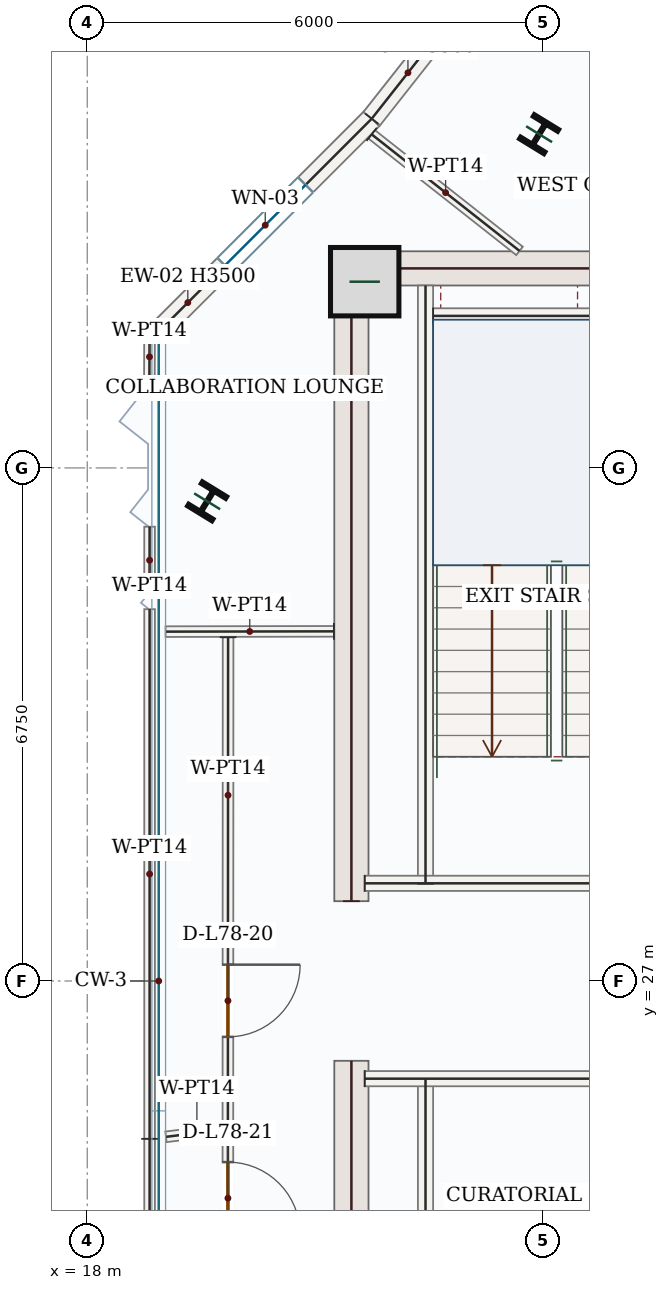
"""IFC4 building model, lengths in metres.
Left out: names, types, materials, properties, quantities, classifications, styles, units other than length and angle.
Written with IfcOpenShell. Run it as: python <this file> out.ifc"""

import sys

from ifc_helpers import new_model, si_unit, direction, frame, frame_2d, origin, origin_2d, place, context, subcontext, project, spatial, rectangle, i_section, extrude, source, transform, mapped, element, fill, save


model = new_model("IFC4")
c1 = context("Model", 3, precision=1e-05, world=origin(), true_north=direction((0.0, 1.0)))
c2 = subcontext(c1, "Body", "Model", "MODEL_VIEW")
j1 = project(units=[si_unit("LENGTHUNIT", "METRE"), si_unit("PLANEANGLEUNIT", "RADIAN")], contexts=[c1])
p1 = place(None, origin())
s1 = spatial("IfcSite", under=j1, at=p1, CompositionType="ELEMENT")
p2 = place(p1, origin())
s2 = spatial("IfcBuilding", under=s1, at=p2, CompositionType="ELEMENT")
p3 = place(p2, frame((0.0, 0.0, 323.55)))
s3 = spatial("IfcBuildingStorey", under=s2, at=p3, CompositionType="ELEMENT", Elevation=323.55)
m1 = source(origin(), c2, "Body", "SweptSolid", [
    extrude(rectangle(XDim=8.55, YDim=0.45, at=frame_2d((4.275, 0.0))), origin(), (0.0, 0.0, 1.0), 3.5),
])
for number, where, z_axis, x_axis in (
    (1, (21.475, 17.4, 0.0), (0.0, 0.0, 1.0), (0.0, 1.0, 0.0)),
    (2, (21.475, 28.05, 0.0), (0.0, 0.0, 1.0), (0.0, 1.0, 0.0)),
):
    element("IfcWall", number, at=place(p3, frame(where, z_axis=z_axis, x_axis=x_axis)), inside=s3, PredefinedType="SHEAR", context=c2, shape_type="MappedRepresentation", body=[
        mapped(m1, transform((0.0, 0.0, 0.0), x_axis=(1.0, 0.0, 0.0), y_axis=(0.0, 1.0, 0.0), z_axis=(0.0, 0.0, 1.0), scale=1.0)),
    ])
m2 = source(origin(), c2, "Body", "SweptSolid", [
    extrude(rectangle(XDim=7.1, YDim=0.45, at=frame_2d((3.55, 0.0))), origin(), (0.0, 0.0, 1.0), 3.5),
])
p4 = place(p3, frame((21.7, 36.375, 0.0), z_axis=(0.0, 0.0, 1.0), x_axis=(1.0, 0.0, 0.0)))
e3 = element("IfcWall", 3, at=p4, inside=s3, PredefinedType="SHEAR", context=c2, shape_type="MappedRepresentation", body=[
    mapped(m2, transform((0.0, 0.0, 0.0), x_axis=(1.0, 0.0, 0.0), y_axis=(0.0, 1.0, 0.0), z_axis=(0.0, 0.0, 1.0), scale=1.0)),
])
m3 = source(origin(), c2, "Body", "SweptSolid", [
    extrude(rectangle(XDim=0.9, YDim=0.9, at=origin_2d()), origin(), (0.0, 0.0, 1.0), 3.75),
])
p5 = place(p3, frame((21.65, 36.2, 0.0), z_axis=(0.0, 0.0, 1.0), x_axis=(1.0, 0.0, 0.0)))
e4 = element("IfcColumn", 4, at=p5, inside=s3, PredefinedType="COLUMN", context=c2, shape_type="MappedRepresentation", body=[
    mapped(m3, transform((0.0, 0.0, 0.0), x_axis=(1.0, 0.0, 0.0), y_axis=(0.0, 1.0, 0.0), z_axis=(0.0, 0.0, 1.0), scale=1.0)),
])
m4 = source(origin(), c2, "Body", "SweptSolid", [
    extrude(i_section(OverallWidth=0.374, OverallDepth=0.372, WebThickness=0.016, FlangeThickness=0.026, FilletRadius=0.018, at=origin_2d()), origin(), (0.0, 0.0, 1.0), 3.75),
])
for number, where, z_axis, x_axis in (
    (5, (23.945, 38.141, 0.0), (0.0, 0.0, 1.0), (-0.853, 0.522, 0.0)),
    (6, (19.577, 33.311, 0.0), (0.0, 0.0, 1.0), (-0.853, 0.522, 0.0)),
):
    element("IfcColumn", number, at=place(p3, frame(where, z_axis=z_axis, x_axis=x_axis)), inside=s3, PredefinedType="COLUMN", context=c2, shape_type="MappedRepresentation", body=[
        mapped(m4, transform((0.0, 0.0, 0.0), x_axis=(1.0, 0.0, 0.0), y_axis=(0.0, 1.0, 0.0), z_axis=(0.0, 0.0, 1.0), scale=1.0)),
    ])
p6 = place(p3, frame((18.94, 35.542, 0.0), z_axis=(0.0, 0.0, 1.0), x_axis=(0.707106781187, 0.707106781187, 0.0)))
e7 = element("IfcWall", 7, at=p6, inside=s3, PredefinedType="SOLIDWALL", context=c2, shape_type="SweptSolid", body=[
    extrude(rectangle(XDim=3.963, YDim=0.28, at=frame_2d((1.982, 0.0))), origin(), (0.0, 0.0, 1.0), 3.5),
])
p7 = place(p6, frame((1.232, 0.0, 0.85)))
e8 = element("IfcOpeningElement", 8, at=p7, cuts=e7, PredefinedType="OPENING", context=c2, shape_type="SweptSolid", body=[
    extrude(rectangle(XDim=1.5, YDim=1.5, at=frame_2d((0.75, 0.75))), frame((0.0, 0.15, 0.0), z_axis=(0.0, -1.0, 0.0), x_axis=(1.0, 0.0, 0.0)), (0.0, 0.0, 1.0), 0.3),
])
p8 = place(p3, frame((21.742, 38.344, 0.0), z_axis=(0.0, 0.0, 1.0), x_axis=(0.619093990715, 0.785316898239, 0.0)))
e9 = element("IfcWall", 9, at=p8, inside=s3, PredefinedType="SOLIDWALL", context=c2, shape_type="SweptSolid", body=[
    extrude(rectangle(XDim=4.878, YDim=0.28, at=frame_2d((2.439, 0.0))), origin(), (0.0, 0.0, 1.0), 3.5),
])
p9 = place(p8, frame((1.689, 0.0, 0.85)))
e10 = element("IfcOpeningElement", 10, at=p9, cuts=e9, PredefinedType="OPENING", context=c2, shape_type="SweptSolid", body=[
    extrude(rectangle(XDim=1.5, YDim=1.5, at=frame_2d((0.75, 0.75))), frame((0.0, 0.15, 0.0), z_axis=(0.0, -1.0, 0.0), x_axis=(1.0, 0.0, 0.0)), (0.0, 0.0, 1.0), 0.3),
])
m5 = source(origin(), c2, "Body", "SweptSolid", [
    extrude(rectangle(XDim=7.87, YDim=0.2, at=frame_2d((3.935, 0.0))), origin(), (0.0, 0.0, 1.0), 3.5),
])
for number, where, z_axis, x_axis in (
    (11, (22.45, 17.85, 0.0), (0.0, 0.0, 1.0), (0.0, 1.0, 0.0)),
    (12, (22.45, 28.28, 0.0), (0.0, 0.0, 1.0), (0.0, 1.0, 0.0)),
):
    element("IfcWall", number, at=place(p3, frame(where, z_axis=z_axis, x_axis=x_axis)), inside=s3, PredefinedType="SOLIDWALL", context=c2, shape_type="MappedRepresentation", body=[
        mapped(m5, transform((0.0, 0.0, 0.0), x_axis=(1.0, 0.0, 0.0), y_axis=(0.0, 1.0, 0.0), z_axis=(0.0, 0.0, 1.0), scale=1.0)),
    ])
m6 = source(origin(), c2, "Body", "SweptSolid", [
    extrude(rectangle(XDim=4.25, YDim=0.2, at=frame_2d((2.125, 0.0))), origin(), (0.0, 0.0, 1.0), 3.5),
])
for number, where, z_axis, x_axis in (
    (13, (21.65, 25.715, 0.0), (0.0, 0.0, 1.0), (1.0, 0.0, 0.0)),
    (14, (21.65, 28.285, 0.0), (0.0, 0.0, 1.0), (1.0, 0.0, 0.0)),
):
    element("IfcWall", number, at=place(p3, frame(where, z_axis=z_axis, x_axis=x_axis)), inside=s3, PredefinedType="SOLIDWALL", context=c2, shape_type="MappedRepresentation", body=[
        mapped(m6, transform((0.0, 0.0, 0.0), x_axis=(1.0, 0.0, 0.0), y_axis=(0.0, 1.0, 0.0), z_axis=(0.0, 0.0, 1.0), scale=1.0)),
    ])
m7 = source(origin(), c2, "Body", "SweptSolid", [
    extrude(rectangle(XDim=3.25, YDim=0.2, at=frame_2d((1.625, 0.0))), origin(), (0.0, 0.0, 1.0), 3.5),
])
p10 = place(p3, frame((22.55, 35.75, 0.0), z_axis=(0.0, 0.0, 1.0), x_axis=(1.0, 0.0, 0.0)))
e15 = element("IfcWall", 15, at=p10, inside=s3, PredefinedType="SOLIDWALL", context=c2, shape_type="MappedRepresentation", body=[
    mapped(m7, transform((0.0, 0.0, 0.0), x_axis=(1.0, 0.0, 0.0), y_axis=(0.0, 1.0, 0.0), z_axis=(0.0, 0.0, 1.0), scale=1.0)),
])
m8 = source(origin(), c2, "Body", "SweptSolid", [
    extrude(rectangle(XDim=2.215, YDim=0.14, at=frame_2d((1.107, 0.0))), origin(), (0.0, 0.0, 1.0), 3.5),
])
p11 = place(p3, frame((21.245, 31.6, 0.0), z_axis=(0.0, 0.0, 1.0), x_axis=(-0.999998633374, -0.001653254657, 0.0)))
e16 = element("IfcWall", 16, at=p11, inside=s3, PredefinedType="PARTITIONING", context=c2, shape_type="MappedRepresentation", body=[
    mapped(m8, transform((0.0, 0.0, 0.0), x_axis=(1.0, 0.0, 0.0), y_axis=(0.0, 1.0, 0.0), z_axis=(0.0, 0.0, 1.0), scale=1.0)),
])
p12 = place(p3, frame((19.853, 31.523, 0.0), z_axis=(0.0, 0.0, 1.0), x_axis=(-0.000377187662, -0.999999928865, 0.0)))
e17 = element("IfcWall", 17, at=p12, inside=s3, PredefinedType="PARTITIONING", context=c2, shape_type="SweptSolid", body=[
    extrude(rectangle(XDim=6.473, YDim=0.14, at=frame_2d((3.236, 0.0))), origin(), (0.0, 0.0, 1.0), 3.5),
])
p13 = place(p12, frame((4.308, 0.0, 0.0)))
e18 = element("IfcOpeningElement", 18, at=p13, cuts=e17, PredefinedType="OPENING", context=c2, shape_type="SweptSolid", body=[
    extrude(rectangle(XDim=0.95, YDim=2.15, at=frame_2d((0.475, 1.075))), frame((0.0, 0.08, 0.0), z_axis=(0.0, -1.0, 0.0), x_axis=(1.0, 0.0, 0.0)), (0.0, 0.0, 1.0), 0.16),
])
m9 = source(origin(), c2, "Body", "SweptSolid", [
    extrude(rectangle(XDim=0.821, YDim=0.14, at=frame_2d((0.41, 0.0))), origin(), (0.0, 0.0, 1.0), 3.5),
])
p14 = place(p3, frame((19.85, 25.05, 0.0), z_axis=(0.0, 0.0, 1.0), x_axis=(-0.992500466698, -0.122240842617, 0.0)))
e19 = element("IfcWall", 19, at=p14, inside=s3, PredefinedType="PARTITIONING", context=c2, shape_type="MappedRepresentation", body=[
    mapped(m9, transform((0.0, 0.0, 0.0), x_axis=(1.0, 0.0, 0.0), y_axis=(0.0, 1.0, 0.0), z_axis=(0.0, 0.0, 1.0), scale=1.0)),
])
m10 = source(origin(), c2, "Body", "SweptSolid", [
    extrude(rectangle(XDim=6.968, YDim=0.14, at=frame_2d((3.484, 0.0))), origin(), (0.0, 0.0, 1.0), 3.5),
])
p15 = place(p3, frame((18.82, 24.923, 0.0), z_axis=(0.0, 0.0, 1.0), x_axis=(0.0, 1.0, 0.0)))
e20 = element("IfcWall", 20, at=p15, inside=s3, PredefinedType="PARTITIONING", context=c2, shape_type="MappedRepresentation", body=[
    mapped(m10, transform((0.0, 0.0, 0.0), x_axis=(1.0, 0.0, 0.0), y_axis=(0.0, 1.0, 0.0), z_axis=(0.0, 0.0, 1.0), scale=1.0)),
])
m11 = source(origin(), c2, "Body", "SweptSolid", [
    extrude(rectangle(XDim=0.882, YDim=0.14, at=frame_2d((0.441, 0.0))), origin(), (0.0, 0.0, 1.0), 3.5),
])
p16 = place(p3, frame((18.82, 32.095, 0.0), z_axis=(0.0, 0.0, 1.0), x_axis=(0.000553556516, 0.999999846788, 0.0)))
e21 = element("IfcWall", 21, at=p16, inside=s3, PredefinedType="PARTITIONING", context=c2, shape_type="MappedRepresentation", body=[
    mapped(m11, transform((0.0, 0.0, 0.0), x_axis=(1.0, 0.0, 0.0), y_axis=(0.0, 1.0, 0.0), z_axis=(0.0, 0.0, 1.0), scale=1.0)),
])
m12 = source(origin(), c2, "Body", "SweptSolid", [
    extrude(rectangle(XDim=0.762, YDim=0.14, at=frame_2d((0.381, 0.0))), origin(), (0.0, 0.0, 1.0), 3.5),
])
p17 = place(p3, frame((18.817, 34.83, 0.0), z_axis=(0.0, 0.0, 1.0), x_axis=(0.004166630498, 0.999991319557, 0.0)))
e22 = element("IfcWall", 22, at=p17, inside=s3, PredefinedType="PARTITIONING", context=c2, shape_type="MappedRepresentation", body=[
    mapped(m12, transform((0.0, 0.0, 0.0), x_axis=(1.0, 0.0, 0.0), y_axis=(0.0, 1.0, 0.0), z_axis=(0.0, 0.0, 1.0), scale=1.0)),
])
m13 = source(origin(), c2, "Body", "SweptSolid", [
    extrude(rectangle(XDim=2.477, YDim=0.14, at=frame_2d((1.239, 0.0))), origin(), (0.0, 0.0, 1.0), 3.5),
])
p18 = place(p3, frame((21.742, 38.138, 0.0), z_axis=(0.0, 0.0, 1.0), x_axis=(0.785339198937, -0.619065701371, 0.0)))
e23 = element("IfcWall", 23, at=p18, inside=s3, PredefinedType="PARTITIONING", context=c2, shape_type="MappedRepresentation", body=[
    mapped(m13, transform((0.0, 0.0, 0.0), x_axis=(1.0, 0.0, 0.0), y_axis=(0.0, 1.0, 0.0), z_axis=(0.0, 0.0, 1.0), scale=1.0)),
])
p19 = place(p3, frame((19.85, 24.975, 0.0), z_axis=(0.0, 0.0, 1.0), x_axis=(0.000379434615, -0.999999928015, 0.0)))
e24 = element("IfcWall", 24, at=p19, inside=s3, PredefinedType="PARTITIONING", context=c2, shape_type="SweptSolid", body=[
    extrude(rectangle(XDim=2.574, YDim=0.14, at=frame_2d((1.287, 0.0))), origin(), (0.0, 0.0, 1.0), 3.5),
])
p20 = place(p19, frame((0.357, 0.0, 0.0)))
e25 = element("IfcOpeningElement", 25, at=p20, cuts=e24, PredefinedType="OPENING", context=c2, shape_type="SweptSolid", body=[
    extrude(rectangle(XDim=0.95, YDim=2.15, at=frame_2d((0.475, 1.075))), frame((0.0, 0.08, 0.0), z_axis=(0.0, -1.0, 0.0), x_axis=(1.0, 0.0, 0.0)), (0.0, 0.0, 1.0), 0.16),
])
m14 = source(origin(), c2, "Body", "SweptSolid", [
    extrude(rectangle(XDim=6.515, YDim=0.14, at=frame_2d((3.258, 0.0))), origin(), (0.0, 0.0, 1.0), 3.5),
])
p21 = place(p3, frame((18.82, 18.408, 0.0), z_axis=(0.0, 0.0, 1.0), x_axis=(0.0, 1.0, 0.0)))
e26 = element("IfcWall", 26, at=p21, inside=s3, PredefinedType="PARTITIONING", context=c2, shape_type="MappedRepresentation", body=[
    mapped(m14, transform((0.0, 0.0, 0.0), x_axis=(1.0, 0.0, 0.0), y_axis=(0.0, 1.0, 0.0), z_axis=(0.0, 0.0, 1.0), scale=1.0)),
])
m15 = source(origin(), c2, "Body", "SweptSolid", [
    extrude(rectangle(XDim=1.5, YDim=1.5, at=frame_2d((0.75, 0.75))), frame((0.0, 0.03, 0.0), z_axis=(0.0, -1.0, 0.0), x_axis=(1.0, 0.0, 0.0)), (0.0, 0.0, 1.0), 0.06),
])
p22 = place(p7, origin())
e27 = element("IfcWindow", 27, at=p22, inside=s3, PartitioningType="SINGLE_PANEL", PredefinedType="WINDOW", context=c2, shape_type="MappedRepresentation", body=[
    mapped(m15, transform((0.0, 0.0, 0.0), x_axis=(1.0, 0.0, 0.0), y_axis=(0.0, 1.0, 0.0), z_axis=(0.0, 0.0, 1.0), scale=1.0)),
])
fill(e8, e27)
m16 = source(origin(), c2, "Body", "SweptSolid", [
    extrude(rectangle(XDim=0.95, YDim=2.15, at=frame_2d((0.475, 1.075))), frame((0.0, 0.025, 0.0), z_axis=(0.0, -1.0, 0.0), x_axis=(1.0, 0.0, 0.0)), (0.0, 0.0, 1.0), 0.05),
])
p23 = place(p13, origin())
e28 = element("IfcDoor", 28, at=p23, inside=s3, OperationType="SINGLE_SWING_LEFT", PredefinedType="DOOR", context=c2, shape_type="MappedRepresentation", body=[
    mapped(m16, transform((0.0, 0.0, 0.0), x_axis=(1.0, 0.0, 0.0), y_axis=(0.0, 1.0, 0.0), z_axis=(0.0, 0.0, 1.0), scale=1.0)),
])
fill(e18, e28)
p24 = place(p20, origin())
e29 = element("IfcDoor", 29, at=p24, inside=s3, OperationType="SINGLE_SWING_RIGHT", PredefinedType="DOOR", context=c2, shape_type="MappedRepresentation", body=[
    mapped(m16, transform((0.0, 0.0, 0.0), x_axis=(1.0, 0.0, 0.0), y_axis=(0.0, 1.0, 0.0), z_axis=(0.0, 0.0, 1.0), scale=1.0)),
])
fill(e25, e29)
save(model, sys.argv[1])
